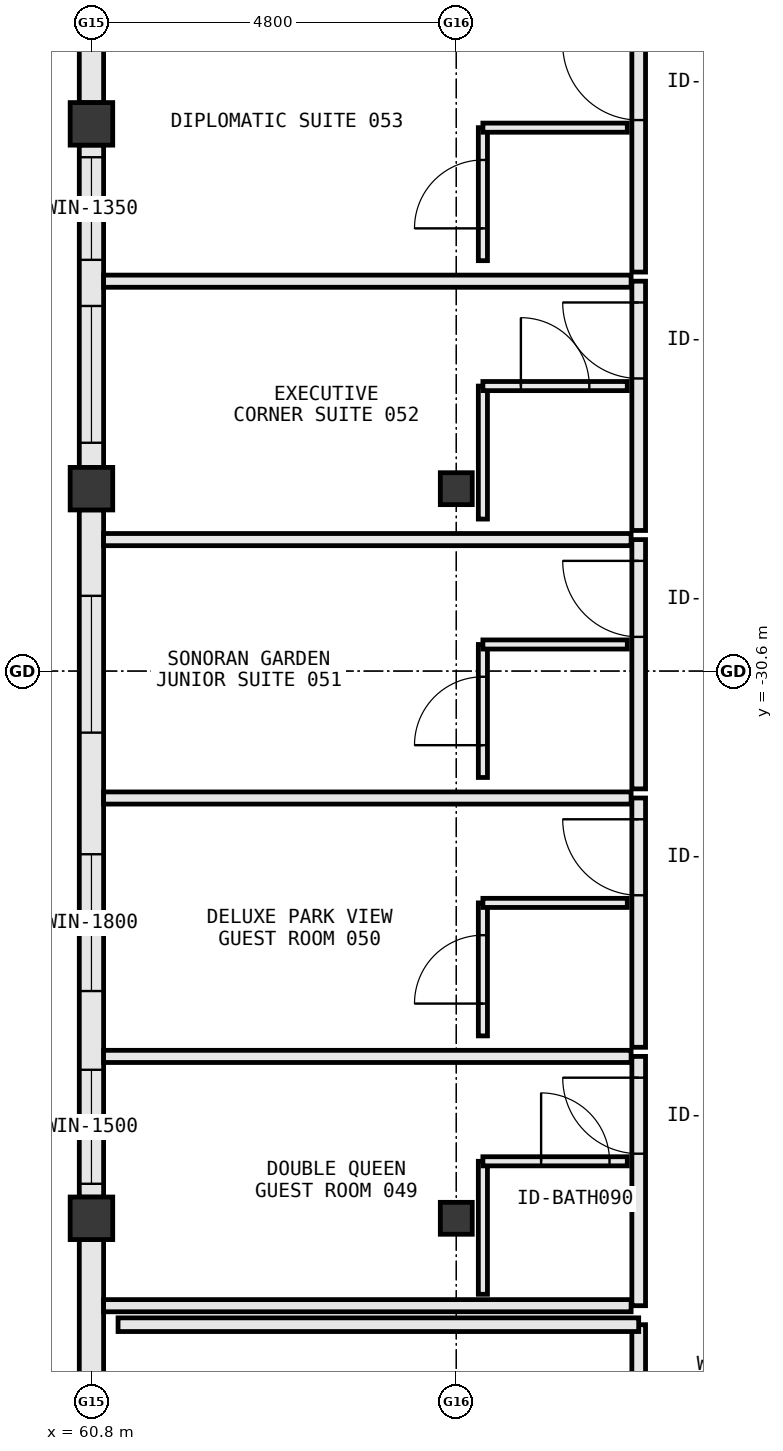
"""IFC4 building model, lengths in metres.
Left out: names, types, materials, properties, quantities, classifications, styles, units other than length and angle.
Written with IfcOpenShell. Run it as: python <this file> out.ifc"""

import sys

from ifc_helpers import new_model, si_unit, direction, frame, frame_2d, origin, origin_2d, place, context, subcontext, project, spatial, rectangle, extrude, element, fill, save


model = new_model("IFC4")
c1 = context("Model", 3, precision=1e-05, world=origin(), true_north=direction((0.0, 1.0)))
c2 = subcontext(c1, "Body", "Model", "MODEL_VIEW")
j1 = project(units=[si_unit("LENGTHUNIT", "METRE"), si_unit("PLANEANGLEUNIT", "RADIAN")], contexts=[c1])
p1 = place(None, origin())
s1 = spatial("IfcSite", under=j1, at=p1, CompositionType="ELEMENT")
p2 = place(p1, origin())
s2 = spatial("IfcBuilding", under=s1, at=p2, CompositionType="ELEMENT")
p3 = place(p2, frame((0.0, 0.0, 16.2)))
s3 = spatial("IfcBuildingStorey", under=s2, at=p3, CompositionType="ELEMENT", Elevation=16.2)
for number, where, z_axis, x_axis in (
    (1, (60.8, -37.8, 0.0), (0.0, 0.0, 1.0), (1.0, 0.0, 0.0)),
    (2, (60.8, -28.2, 0.0), (0.0, 0.0, 1.0), (1.0, 0.0, 0.0)),
    (3, (60.8, -23.4, 0.0), (0.0, 0.0, 1.0), (1.0, 0.0, 0.0)),
):
    element("IfcColumn", number, at=place(p3, frame(where, z_axis=z_axis, x_axis=x_axis)), inside=s3, PredefinedType="COLUMN", context=c2, shape_type="SweptSolid", body=[
        extrude(rectangle(XDim=0.56, YDim=0.56, at=origin_2d()), origin(), (0.0, 0.0, 1.0), 3.8),
    ])
for number, where, z_axis, x_axis in (
    (4, (65.6, -37.8, 0.0), (0.0, 0.0, 1.0), (1.0, 0.0, 0.0)),
    (5, (65.6, -28.2, 0.0), (0.0, 0.0, 1.0), (1.0, 0.0, 0.0)),
):
    element("IfcColumn", number, at=place(p3, frame(where, z_axis=z_axis, x_axis=x_axis)), inside=s3, PredefinedType="COLUMN", context=c2, shape_type="SweptSolid", body=[
        extrude(rectangle(XDim=0.42, YDim=0.42, at=origin_2d()), origin(), (0.0, 0.0, 1.0), 3.8),
    ])
p4 = place(p3, frame((60.8, -18.878, 0.0), z_axis=(0.0, 0.0, 1.0), x_axis=(0.0, -1.0, 0.0)))
e6 = element("IfcWall", 6, at=p4, inside=s3, PredefinedType="STANDARD", context=c2, shape_type="SweptSolid", body=[
    extrude(rectangle(XDim=4.244, YDim=0.32, at=frame_2d((2.122, 0.0))), origin(), (0.0, 0.0, 1.0), 3.015),
])
p5 = place(p4, frame((0.636, 0.0, 0.85)))
e7 = element("IfcOpeningElement", 7, at=p5, cuts=e6, PredefinedType="OPENING", context=c2, shape_type="SweptSolid", body=[
    extrude(rectangle(XDim=1.8, YDim=1.85, at=frame_2d((0.9, 0.925))), frame((0.0, 0.172, 0.0), z_axis=(0.0, -1.0, 0.0), x_axis=(1.0, 0.0, 0.0)), (0.0, 0.0, 1.0), 0.344),
])
p6 = place(p3, frame((60.8, -23.678, 0.0), z_axis=(0.0, 0.0, 1.0), x_axis=(0.0, -1.0, 0.0)))
e8 = element("IfcWall", 8, at=p6, inside=s3, PredefinedType="STANDARD", context=c2, shape_type="SweptSolid", body=[
    extrude(rectangle(XDim=4.244, YDim=0.32, at=frame_2d((2.122, 0.0))), origin(), (0.0, 0.0, 1.0), 3.015),
])
p7 = place(p6, frame((2.118, 0.0, 0.85)))
e9 = element("IfcOpeningElement", 9, at=p7, cuts=e8, PredefinedType="OPENING", context=c2, shape_type="SweptSolid", body=[
    extrude(rectangle(XDim=1.8, YDim=1.85, at=frame_2d((0.9, 0.925))), frame((0.0, 0.172, 0.0), z_axis=(0.0, -1.0, 0.0), x_axis=(1.0, 0.0, 0.0)), (0.0, 0.0, 1.0), 0.344),
])
p8 = place(p6, frame((0.161, 0.0, 0.85)))
e10 = element("IfcOpeningElement", 10, at=p8, cuts=e8, PredefinedType="OPENING", context=c2, shape_type="SweptSolid", body=[
    extrude(rectangle(XDim=1.35, YDim=1.65, at=frame_2d((0.675, 0.825))), frame((0.0, 0.172, 0.0), z_axis=(0.0, -1.0, 0.0), x_axis=(1.0, 0.0, 0.0)), (0.0, 0.0, 1.0), 0.344),
])
p9 = place(p3, frame((60.8, -28.478, 0.0), z_axis=(0.0, 0.0, 1.0), x_axis=(0.0, -1.0, 0.0)))
e11 = element("IfcWall", 11, at=p9, inside=s3, PredefinedType="STANDARD", context=c2, shape_type="SweptSolid", body=[
    extrude(rectangle(XDim=9.044, YDim=0.32, at=frame_2d((4.522, 0.0))), origin(), (0.0, 0.0, 1.0), 2.915),
])
p10 = place(p9, frame((7.368, 0.0, 0.85)))
e12 = element("IfcOpeningElement", 12, at=p10, cuts=e11, PredefinedType="OPENING", context=c2, shape_type="SweptSolid", body=[
    extrude(rectangle(XDim=1.5, YDim=1.75, at=frame_2d((0.75, 0.875))), frame((0.0, 0.172, 0.0), z_axis=(0.0, -1.0, 0.0), x_axis=(1.0, 0.0, 0.0)), (0.0, 0.0, 1.0), 0.344),
])
p11 = place(p9, frame((4.532, 0.0, 0.85)))
e13 = element("IfcOpeningElement", 13, at=p11, cuts=e11, PredefinedType="OPENING", context=c2, shape_type="SweptSolid", body=[
    extrude(rectangle(XDim=1.8, YDim=1.85, at=frame_2d((0.9, 0.925))), frame((0.0, 0.172, 0.0), z_axis=(0.0, -1.0, 0.0), x_axis=(1.0, 0.0, 0.0)), (0.0, 0.0, 1.0), 0.344),
])
p12 = place(p9, frame((1.132, 0.0, 0.85)))
e14 = element("IfcOpeningElement", 14, at=p12, cuts=e11, PredefinedType="OPENING", context=c2, shape_type="SweptSolid", body=[
    extrude(rectangle(XDim=1.8, YDim=1.85, at=frame_2d((0.9, 0.925))), frame((0.0, 0.172, 0.0), z_axis=(0.0, -1.0, 0.0), x_axis=(1.0, 0.0, 0.0)), (0.0, 0.0, 1.0), 0.344),
])
p13 = place(p3, frame((60.8, -38.078, 0.0), z_axis=(0.0, 0.0, 1.0), x_axis=(0.0, -1.0, 0.0)))
e15 = element("IfcWall", 15, at=p13, inside=s3, PredefinedType="STANDARD", context=c2, shape_type="SweptSolid", body=[
    extrude(rectangle(XDim=9.044, YDim=0.32, at=frame_2d((4.522, 0.0))), origin(), (0.0, 0.0, 1.0), 2.915),
])
p14 = place(p3, frame((68.0, -47.05, 0.0), z_axis=(0.0, 0.0, 1.0), x_axis=(0.0, 1.0, 0.0)))
e16 = element("IfcWall", 16, at=p14, inside=s3, PredefinedType="PARTITIONING", context=c2, shape_type="SweptSolid", body=[
    extrude(rectangle(XDim=7.85, YDim=0.18, at=frame_2d((3.925, 0.0))), origin(), (0.0, 0.0, 1.0), 3.56),
])
p15 = place(p14, frame((3.4, 0.0, 0.0)))
e17 = element("IfcOpeningElement", 17, at=p15, cuts=e16, PredefinedType="OPENING", context=c2, shape_type="SweptSolid", body=[
    extrude(rectangle(XDim=1.05, YDim=2.2, at=frame_2d((0.525, 1.1))), frame((0.0, 0.102, 0.0), z_axis=(0.0, -1.0, 0.0), x_axis=(1.0, 0.0, 0.0)), (0.0, 0.0, 1.0), 0.204),
])
p16 = place(p3, frame((68.0, -39.2, 0.0), z_axis=(0.0, 0.0, 1.0), x_axis=(-1.0, 0.0, 0.0)))
e18 = element("IfcWall", 18, at=p16, inside=s3, PredefinedType="PARTITIONING", context=c2, shape_type="SweptSolid", body=[
    extrude(rectangle(XDim=6.85, YDim=0.18, at=frame_2d((3.425, 0.0))), origin(), (0.0, 0.0, 1.0), 3.56),
])
p17 = place(p3, frame((68.0, -38.95, 0.0), z_axis=(0.0, 0.0, 1.0), x_axis=(0.0, 1.0, 0.0)))
e19 = element("IfcWall", 19, at=p17, inside=s3, PredefinedType="PARTITIONING", context=c2, shape_type="SweptSolid", body=[
    extrude(rectangle(XDim=3.28, YDim=0.18, at=frame_2d((1.64, 0.0))), origin(), (0.0, 0.0, 1.0), 3.56),
])
p18 = place(p17, frame((2.0, 0.0, 0.0)))
e20 = element("IfcOpeningElement", 20, at=p18, cuts=e19, PredefinedType="OPENING", context=c2, shape_type="SweptSolid", body=[
    extrude(rectangle(XDim=1.0, YDim=2.2, at=frame_2d((0.5, 1.1))), frame((0.0, 0.102, 0.0), z_axis=(0.0, -1.0, 0.0), x_axis=(1.0, 0.0, 0.0)), (0.0, 0.0, 1.0), 0.204),
])
for number, where, z_axis, x_axis in (
    (21, (60.96, -38.95, 0.0), (0.0, 0.0, 1.0), (1.0, 0.0, 0.0)),
    (22, (60.96, -35.67, 0.0), (0.0, 0.0, 1.0), (1.0, 0.0, 0.0)),
):
    element("IfcWall", number, at=place(p3, frame(where, z_axis=z_axis, x_axis=x_axis)), inside=s3, PredefinedType="PARTITIONING", context=c2, shape_type="SweptSolid", body=[
        extrude(rectangle(XDim=6.94, YDim=0.16, at=frame_2d((3.47, 0.0))), origin(), (0.0, 0.0, 1.0), 3.56),
    ])
p19 = place(p3, frame((65.95, -38.8, 0.0), z_axis=(0.0, 0.0, 1.0), x_axis=(0.0, 1.0, 0.0)))
e23 = element("IfcWall", 23, at=p19, inside=s3, PredefinedType="PARTITIONING", context=c2, shape_type="SweptSolid", body=[
    extrude(rectangle(XDim=1.75, YDim=0.12, at=frame_2d((0.875, 0.0))), origin(), (0.0, 0.0, 1.0), 2.915),
])
p20 = place(p3, frame((65.95, -37.05, 0.0), z_axis=(0.0, 0.0, 1.0), x_axis=(1.0, 0.0, 0.0)))
e24 = element("IfcWall", 24, at=p20, inside=s3, PredefinedType="PARTITIONING", context=c2, shape_type="SweptSolid", body=[
    extrude(rectangle(XDim=1.9, YDim=0.12, at=frame_2d((0.95, 0.0))), origin(), (0.0, 0.0, 1.0), 3.56),
])
p21 = place(p20, frame((0.766, 0.0, 0.0)))
e25 = element("IfcOpeningElement", 25, at=p21, cuts=e24, PredefinedType="OPENING", context=c2, shape_type="SweptSolid", body=[
    extrude(rectangle(XDim=0.9, YDim=2.15, at=frame_2d((0.45, 1.075))), frame((0.0, 0.072, 0.0), z_axis=(0.0, -1.0, 0.0), x_axis=(1.0, 0.0, 0.0)), (0.0, 0.0, 1.0), 0.144),
])
p22 = place(p3, frame((68.0, -35.55, 0.0), z_axis=(0.0, 0.0, 1.0), x_axis=(0.0, 1.0, 0.0)))
e26 = element("IfcWall", 26, at=p22, inside=s3, PredefinedType="PARTITIONING", context=c2, shape_type="SweptSolid", body=[
    extrude(rectangle(XDim=3.28, YDim=0.18, at=frame_2d((1.64, 0.0))), origin(), (0.0, 0.0, 1.0), 3.56),
])
p23 = place(p22, frame((2.0, 0.0, 0.0)))
e27 = element("IfcOpeningElement", 27, at=p23, cuts=e26, PredefinedType="OPENING", context=c2, shape_type="SweptSolid", body=[
    extrude(rectangle(XDim=1.0, YDim=2.2, at=frame_2d((0.5, 1.1))), frame((0.0, 0.102, 0.0), z_axis=(0.0, -1.0, 0.0), x_axis=(1.0, 0.0, 0.0)), (0.0, 0.0, 1.0), 0.204),
])
p24 = place(p3, frame((60.96, -32.27, 0.0), z_axis=(0.0, 0.0, 1.0), x_axis=(1.0, 0.0, 0.0)))
e28 = element("IfcWall", 28, at=p24, inside=s3, PredefinedType="PARTITIONING", context=c2, shape_type="SweptSolid", body=[
    extrude(rectangle(XDim=6.94, YDim=0.16, at=frame_2d((3.47, 0.0))), origin(), (0.0, 0.0, 1.0), 3.56),
])
p25 = place(p3, frame((65.95, -35.4, 0.0), z_axis=(0.0, 0.0, 1.0), x_axis=(0.0, 1.0, 0.0)))
e29 = element("IfcWall", 29, at=p25, inside=s3, PredefinedType="PARTITIONING", context=c2, shape_type="SweptSolid", body=[
    extrude(rectangle(XDim=1.75, YDim=0.12, at=frame_2d((0.875, 0.0))), origin(), (0.0, 0.0, 1.0), 2.915),
])
p26 = place(p25, frame((0.425, 0.0, 0.0)))
e30 = element("IfcOpeningElement", 30, at=p26, cuts=e29, PredefinedType="OPENING", context=c2, shape_type="SweptSolid", body=[
    extrude(rectangle(XDim=0.9, YDim=2.15, at=frame_2d((0.45, 1.075))), frame((0.0, 0.072, 0.0), z_axis=(0.0, -1.0, 0.0), x_axis=(1.0, 0.0, 0.0)), (0.0, 0.0, 1.0), 0.144),
])
p27 = place(p3, frame((65.95, -33.65, 0.0), z_axis=(0.0, 0.0, 1.0), x_axis=(1.0, 0.0, 0.0)))
e31 = element("IfcWall", 31, at=p27, inside=s3, PredefinedType="PARTITIONING", context=c2, shape_type="SweptSolid", body=[
    extrude(rectangle(XDim=1.9, YDim=0.12, at=frame_2d((0.95, 0.0))), origin(), (0.0, 0.0, 1.0), 3.56),
])
p28 = place(p3, frame((68.0, -32.15, 0.0), z_axis=(0.0, 0.0, 1.0), x_axis=(0.0, 1.0, 0.0)))
e32 = element("IfcWall", 32, at=p28, inside=s3, PredefinedType="PARTITIONING", context=c2, shape_type="SweptSolid", body=[
    extrude(rectangle(XDim=3.28, YDim=0.18, at=frame_2d((1.64, 0.0))), origin(), (0.0, 0.0, 1.0), 3.56),
])
p29 = place(p28, frame((2.0, 0.0, 0.0)))
e33 = element("IfcOpeningElement", 33, at=p29, cuts=e32, PredefinedType="OPENING", context=c2, shape_type="SweptSolid", body=[
    extrude(rectangle(XDim=1.0, YDim=2.2, at=frame_2d((0.5, 1.1))), frame((0.0, 0.102, 0.0), z_axis=(0.0, -1.0, 0.0), x_axis=(1.0, 0.0, 0.0)), (0.0, 0.0, 1.0), 0.204),
])
p30 = place(p3, frame((60.96, -28.87, 0.0), z_axis=(0.0, 0.0, 1.0), x_axis=(1.0, 0.0, 0.0)))
e34 = element("IfcWall", 34, at=p30, inside=s3, PredefinedType="PARTITIONING", context=c2, shape_type="SweptSolid", body=[
    extrude(rectangle(XDim=6.94, YDim=0.16, at=frame_2d((3.47, 0.0))), origin(), (0.0, 0.0, 1.0), 3.56),
])
p31 = place(p3, frame((65.95, -32.0, 0.0), z_axis=(0.0, 0.0, 1.0), x_axis=(0.0, 1.0, 0.0)))
e35 = element("IfcWall", 35, at=p31, inside=s3, PredefinedType="PARTITIONING", context=c2, shape_type="SweptSolid", body=[
    extrude(rectangle(XDim=1.75, YDim=0.12, at=frame_2d((0.875, 0.0))), origin(), (0.0, 0.0, 1.0), 2.915),
])
p32 = place(p31, frame((0.425, 0.0, 0.0)))
e36 = element("IfcOpeningElement", 36, at=p32, cuts=e35, PredefinedType="OPENING", context=c2, shape_type="SweptSolid", body=[
    extrude(rectangle(XDim=0.9, YDim=2.15, at=frame_2d((0.45, 1.075))), frame((0.0, 0.072, 0.0), z_axis=(0.0, -1.0, 0.0), x_axis=(1.0, 0.0, 0.0)), (0.0, 0.0, 1.0), 0.144),
])
p33 = place(p3, frame((65.95, -30.25, 0.0), z_axis=(0.0, 0.0, 1.0), x_axis=(1.0, 0.0, 0.0)))
e37 = element("IfcWall", 37, at=p33, inside=s3, PredefinedType="PARTITIONING", context=c2, shape_type="SweptSolid", body=[
    extrude(rectangle(XDim=1.9, YDim=0.12, at=frame_2d((0.95, 0.0))), origin(), (0.0, 0.0, 1.0), 3.56),
])
p34 = place(p3, frame((68.0, -28.75, 0.0), z_axis=(0.0, 0.0, 1.0), x_axis=(0.0, 1.0, 0.0)))
e38 = element("IfcWall", 38, at=p34, inside=s3, PredefinedType="PARTITIONING", context=c2, shape_type="SweptSolid", body=[
    extrude(rectangle(XDim=3.28, YDim=0.18, at=frame_2d((1.64, 0.0))), origin(), (0.0, 0.0, 1.0), 3.56),
])
p35 = place(p34, frame((2.0, 0.0, 0.0)))
e39 = element("IfcOpeningElement", 39, at=p35, cuts=e38, PredefinedType="OPENING", context=c2, shape_type="SweptSolid", body=[
    extrude(rectangle(XDim=1.0, YDim=2.2, at=frame_2d((0.5, 1.1))), frame((0.0, 0.102, 0.0), z_axis=(0.0, -1.0, 0.0), x_axis=(1.0, 0.0, 0.0)), (0.0, 0.0, 1.0), 0.204),
])
p36 = place(p3, frame((60.96, -25.47, 0.0), z_axis=(0.0, 0.0, 1.0), x_axis=(1.0, 0.0, 0.0)))
e40 = element("IfcWall", 40, at=p36, inside=s3, PredefinedType="PARTITIONING", context=c2, shape_type="SweptSolid", body=[
    extrude(rectangle(XDim=6.94, YDim=0.16, at=frame_2d((3.47, 0.0))), origin(), (0.0, 0.0, 1.0), 3.56),
])
p37 = place(p3, frame((65.95, -28.6, 0.0), z_axis=(0.0, 0.0, 1.0), x_axis=(0.0, 1.0, 0.0)))
e41 = element("IfcWall", 41, at=p37, inside=s3, PredefinedType="PARTITIONING", context=c2, shape_type="SweptSolid", body=[
    extrude(rectangle(XDim=1.75, YDim=0.12, at=frame_2d((0.875, 0.0))), origin(), (0.0, 0.0, 1.0), 2.915),
])
p38 = place(p3, frame((65.95, -26.85, 0.0), z_axis=(0.0, 0.0, 1.0), x_axis=(1.0, 0.0, 0.0)))
e42 = element("IfcWall", 42, at=p38, inside=s3, PredefinedType="PARTITIONING", context=c2, shape_type="SweptSolid", body=[
    extrude(rectangle(XDim=1.9, YDim=0.12, at=frame_2d((0.95, 0.0))), origin(), (0.0, 0.0, 1.0), 3.56),
])
p39 = place(p38, frame((0.5, 0.0, 0.0)))
e43 = element("IfcOpeningElement", 43, at=p39, cuts=e42, PredefinedType="OPENING", context=c2, shape_type="SweptSolid", body=[
    extrude(rectangle(XDim=0.9, YDim=2.15, at=frame_2d((0.45, 1.075))), frame((0.0, 0.072, 0.0), z_axis=(0.0, -1.0, 0.0), x_axis=(1.0, 0.0, 0.0)), (0.0, 0.0, 1.0), 0.144),
])
p40 = place(p3, frame((68.0, -25.35, 0.0), z_axis=(0.0, 0.0, 1.0), x_axis=(0.0, 1.0, 0.0)))
e44 = element("IfcWall", 44, at=p40, inside=s3, PredefinedType="PARTITIONING", context=c2, shape_type="SweptSolid", body=[
    extrude(rectangle(XDim=3.28, YDim=0.18, at=frame_2d((1.64, 0.0))), origin(), (0.0, 0.0, 1.0), 3.56),
])
p41 = place(p40, frame((2.0, 0.0, 0.0)))
e45 = element("IfcOpeningElement", 45, at=p41, cuts=e44, PredefinedType="OPENING", context=c2, shape_type="SweptSolid", body=[
    extrude(rectangle(XDim=1.0, YDim=2.2, at=frame_2d((0.5, 1.1))), frame((0.0, 0.102, 0.0), z_axis=(0.0, -1.0, 0.0), x_axis=(1.0, 0.0, 0.0)), (0.0, 0.0, 1.0), 0.204),
])
p42 = place(p3, frame((65.95, -25.2, 0.0), z_axis=(0.0, 0.0, 1.0), x_axis=(0.0, 1.0, 0.0)))
e46 = element("IfcWall", 46, at=p42, inside=s3, PredefinedType="PARTITIONING", context=c2, shape_type="SweptSolid", body=[
    extrude(rectangle(XDim=1.75, YDim=0.12, at=frame_2d((0.875, 0.0))), origin(), (0.0, 0.0, 1.0), 2.915),
])
p43 = place(p42, frame((0.425, 0.0, 0.0)))
e47 = element("IfcOpeningElement", 47, at=p43, cuts=e46, PredefinedType="OPENING", context=c2, shape_type="SweptSolid", body=[
    extrude(rectangle(XDim=0.9, YDim=2.15, at=frame_2d((0.45, 1.075))), frame((0.0, 0.072, 0.0), z_axis=(0.0, -1.0, 0.0), x_axis=(1.0, 0.0, 0.0)), (0.0, 0.0, 1.0), 0.144),
])
p44 = place(p3, frame((65.95, -23.45, 0.0), z_axis=(0.0, 0.0, 1.0), x_axis=(1.0, 0.0, 0.0)))
e48 = element("IfcWall", 48, at=p44, inside=s3, PredefinedType="PARTITIONING", context=c2, shape_type="SweptSolid", body=[
    extrude(rectangle(XDim=1.9, YDim=0.12, at=frame_2d((0.95, 0.0))), origin(), (0.0, 0.0, 1.0), 2.695),
])
p45 = place(p10, origin())
e49 = element("IfcWindow", 49, at=p45, inside=s3, PartitioningType="SINGLE_PANEL", PredefinedType="WINDOW", context=c2, shape_type="SweptSolid", body=[
    extrude(rectangle(XDim=1.5, YDim=1.75, at=frame_2d((0.75, 0.875))), frame((0.0, 0.03, 0.0), z_axis=(0.0, -1.0, 0.0), x_axis=(1.0, 0.0, 0.0)), (0.0, 0.0, 1.0), 0.06),
])
fill(e12, e49)
p46 = place(p11, origin())
e50 = element("IfcWindow", 50, at=p46, inside=s3, PartitioningType="SINGLE_PANEL", PredefinedType="WINDOW", context=c2, shape_type="SweptSolid", body=[
    extrude(rectangle(XDim=1.8, YDim=1.85, at=frame_2d((0.9, 0.925))), frame((0.0, 0.03, 0.0), z_axis=(0.0, -1.0, 0.0), x_axis=(1.0, 0.0, 0.0)), (0.0, 0.0, 1.0), 0.06),
])
fill(e13, e50)
p47 = place(p12, origin())
e51 = element("IfcWindow", 51, at=p47, inside=s3, PartitioningType="SINGLE_PANEL", PredefinedType="WINDOW", context=c2, shape_type="SweptSolid", body=[
    extrude(rectangle(XDim=1.8, YDim=1.85, at=frame_2d((0.9, 0.925))), frame((0.0, 0.03, 0.0), z_axis=(0.0, -1.0, 0.0), x_axis=(1.0, 0.0, 0.0)), (0.0, 0.0, 1.0), 0.06),
])
fill(e14, e51)
p48 = place(p7, origin())
e52 = element("IfcWindow", 52, at=p48, inside=s3, PartitioningType="SINGLE_PANEL", PredefinedType="WINDOW", context=c2, shape_type="SweptSolid", body=[
    extrude(rectangle(XDim=1.8, YDim=1.85, at=frame_2d((0.9, 0.925))), frame((0.0, 0.03, 0.0), z_axis=(0.0, -1.0, 0.0), x_axis=(1.0, 0.0, 0.0)), (0.0, 0.0, 1.0), 0.06),
])
fill(e9, e52)
p49 = place(p8, origin())
e53 = element("IfcWindow", 53, at=p49, inside=s3, PartitioningType="SINGLE_PANEL", PredefinedType="WINDOW", context=c2, shape_type="SweptSolid", body=[
    extrude(rectangle(XDim=1.35, YDim=1.65, at=frame_2d((0.675, 0.825))), frame((0.0, 0.03, 0.0), z_axis=(0.0, -1.0, 0.0), x_axis=(1.0, 0.0, 0.0)), (0.0, 0.0, 1.0), 0.06),
])
fill(e10, e53)
p50 = place(p18, origin())
e54 = element("IfcDoor", 54, at=p50, inside=s3, OperationType="SINGLE_SWING_RIGHT", PredefinedType="DOOR", context=c2, shape_type="SweptSolid", body=[
    extrude(rectangle(XDim=1.0, YDim=2.2, at=frame_2d((0.5, 1.1))), frame((0.0, 0.025, 0.0), z_axis=(0.0, -1.0, 0.0), x_axis=(1.0, 0.0, 0.0)), (0.0, 0.0, 1.0), 0.05),
])
fill(e20, e54)
p51 = place(p21, origin())
e55 = element("IfcDoor", 55, at=p51, inside=s3, OperationType="SINGLE_SWING_LEFT", PredefinedType="DOOR", context=c2, shape_type="SweptSolid", body=[
    extrude(rectangle(XDim=0.9, YDim=2.15, at=frame_2d((0.45, 1.075))), frame((0.0, 0.025, 0.0), z_axis=(0.0, -1.0, 0.0), x_axis=(1.0, 0.0, 0.0)), (0.0, 0.0, 1.0), 0.05),
])
fill(e25, e55)
p52 = place(p23, origin())
e56 = element("IfcDoor", 56, at=p52, inside=s3, OperationType="SINGLE_SWING_RIGHT", PredefinedType="DOOR", context=c2, shape_type="SweptSolid", body=[
    extrude(rectangle(XDim=1.0, YDim=2.2, at=frame_2d((0.5, 1.1))), frame((0.0, 0.025, 0.0), z_axis=(0.0, -1.0, 0.0), x_axis=(1.0, 0.0, 0.0)), (0.0, 0.0, 1.0), 0.05),
])
fill(e27, e56)
p53 = place(p26, origin())
e57 = element("IfcDoor", 57, at=p53, inside=s3, OperationType="SINGLE_SWING_LEFT", PredefinedType="DOOR", context=c2, shape_type="SweptSolid", body=[
    extrude(rectangle(XDim=0.9, YDim=2.15, at=frame_2d((0.45, 1.075))), frame((0.0, 0.025, 0.0), z_axis=(0.0, -1.0, 0.0), x_axis=(1.0, 0.0, 0.0)), (0.0, 0.0, 1.0), 0.05),
])
fill(e30, e57)
p54 = place(p29, origin())
e58 = element("IfcDoor", 58, at=p54, inside=s3, OperationType="SINGLE_SWING_RIGHT", PredefinedType="DOOR", context=c2, shape_type="SweptSolid", body=[
    extrude(rectangle(XDim=1.0, YDim=2.2, at=frame_2d((0.5, 1.1))), frame((0.0, 0.025, 0.0), z_axis=(0.0, -1.0, 0.0), x_axis=(1.0, 0.0, 0.0)), (0.0, 0.0, 1.0), 0.05),
])
fill(e33, e58)
p55 = place(p32, origin())
e59 = element("IfcDoor", 59, at=p55, inside=s3, OperationType="SINGLE_SWING_LEFT", PredefinedType="DOOR", context=c2, shape_type="SweptSolid", body=[
    extrude(rectangle(XDim=0.9, YDim=2.15, at=frame_2d((0.45, 1.075))), frame((0.0, 0.025, 0.0), z_axis=(0.0, -1.0, 0.0), x_axis=(1.0, 0.0, 0.0)), (0.0, 0.0, 1.0), 0.05),
])
fill(e36, e59)
p56 = place(p35, origin())
e60 = element("IfcDoor", 60, at=p56, inside=s3, OperationType="SINGLE_SWING_RIGHT", PredefinedType="DOOR", context=c2, shape_type="SweptSolid", body=[
    extrude(rectangle(XDim=1.0, YDim=2.2, at=frame_2d((0.5, 1.1))), frame((0.0, 0.025, 0.0), z_axis=(0.0, -1.0, 0.0), x_axis=(1.0, 0.0, 0.0)), (0.0, 0.0, 1.0), 0.05),
])
fill(e39, e60)
p57 = place(p39, origin())
e61 = element("IfcDoor", 61, at=p57, inside=s3, OperationType="SINGLE_SWING_LEFT", PredefinedType="DOOR", context=c2, shape_type="SweptSolid", body=[
    extrude(rectangle(XDim=0.9, YDim=2.15, at=frame_2d((0.45, 1.075))), frame((0.0, 0.025, 0.0), z_axis=(0.0, -1.0, 0.0), x_axis=(1.0, 0.0, 0.0)), (0.0, 0.0, 1.0), 0.05),
])
fill(e43, e61)
p58 = place(p41, origin())
e62 = element("IfcDoor", 62, at=p58, inside=s3, OperationType="SINGLE_SWING_RIGHT", PredefinedType="DOOR", context=c2, shape_type="SweptSolid", body=[
    extrude(rectangle(XDim=1.0, YDim=2.2, at=frame_2d((0.5, 1.1))), frame((0.0, 0.025, 0.0), z_axis=(0.0, -1.0, 0.0), x_axis=(1.0, 0.0, 0.0)), (0.0, 0.0, 1.0), 0.05),
])
fill(e45, e62)
p59 = place(p43, origin())
e63 = element("IfcDoor", 63, at=p59, inside=s3, OperationType="SINGLE_SWING_LEFT", PredefinedType="DOOR", context=c2, shape_type="SweptSolid", body=[
    extrude(rectangle(XDim=0.9, YDim=2.15, at=frame_2d((0.45, 1.075))), frame((0.0, 0.025, 0.0), z_axis=(0.0, -1.0, 0.0), x_axis=(1.0, 0.0, 0.0)), (0.0, 0.0, 1.0), 0.05),
])
fill(e47, e63)
save(model, sys.argv[1])
